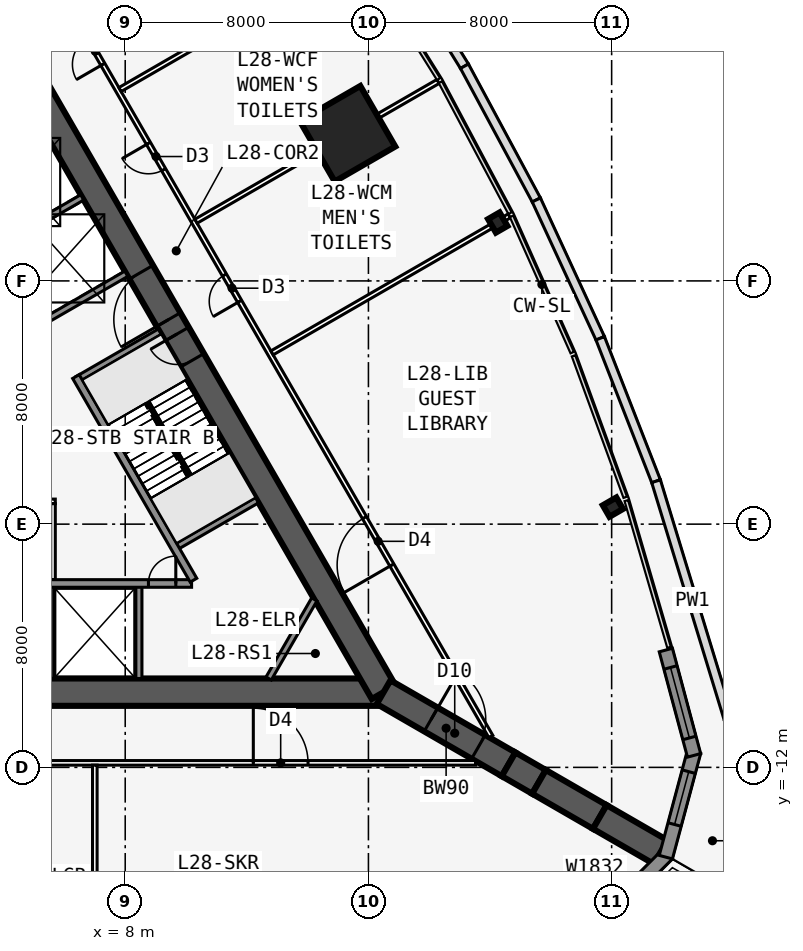
"""IFC4 building model, lengths in metres.
Left out: names, types, materials, properties, quantities, classifications, styles, units other than length and angle.
Written with IfcOpenShell. Run it as: python <this file> out.ifc"""

import sys

from ifc_helpers import new_model, si_unit, direction, frame, frame_2d, origin, origin_2d, place, context, subcontext, project, spatial, polyline, rectangle, i_section, outline, extrude, element, fill, save


model = new_model("IFC4")
c1 = context("Model", 3, precision=1e-05, world=origin(), true_north=direction((0.0, 1.0)))
c2 = subcontext(c1, "Body", "Model", "MODEL_VIEW")
j1 = project(units=[si_unit("LENGTHUNIT", "METRE"), si_unit("PLANEANGLEUNIT", "RADIAN")], contexts=[c1])
p1 = place(None, origin())
s1 = spatial("IfcSite", under=j1, at=p1, CompositionType="ELEMENT")
p2 = place(p1, origin())
s2 = spatial("IfcBuilding", under=s1, at=p2, CompositionType="ELEMENT")
p3 = place(p2, frame((0.0, 0.0, 109.7)))
s3 = spatial("IfcBuildingStorey", under=s2, at=p3, CompositionType="ELEMENT", Elevation=109.7)
p4 = place(p3, frame((-16.5, -9.526, 0.0), z_axis=(0.0, 0.0, 1.0), x_axis=(1.0, 0.0, 0.0)))
e1 = element("IfcWall", 1, at=p4, inside=s3, PredefinedType="SHEAR", context=c2, shape_type="SweptSolid", body=[
    extrude(rectangle(XDim=33.0, YDim=0.9, at=frame_2d((16.5, 0.0))), origin(), (0.0, 0.0, 1.0), 5.0),
])
p5 = place(p4, frame((14.05, 0.0, 0.0)))
e2 = element("IfcOpeningElement", 2, at=p5, cuts=e1, PredefinedType="OPENING", context=c2, shape_type="SweptSolid", body=[
    extrude(rectangle(XDim=1.8, YDim=2.13, at=frame_2d((0.9, 1.065))), frame((0.0, 0.46, 0.0), z_axis=(0.0, -1.0, 0.0), x_axis=(1.0, 0.0, 0.0)), (0.0, 0.0, 1.0), 0.92),
])
p6 = place(p3, frame((-0.55, -5.951, 0.0), z_axis=(0.0, 0.0, 1.0), x_axis=(1.0, 0.0, 0.0)))
e3 = element("IfcWall", 3, at=p6, inside=s3, PredefinedType="SOLIDWALL", context=c2, shape_type="SweptSolid", body=[
    extrude(rectangle(XDim=10.733, YDim=0.25, at=frame_2d((5.366, 0.0))), origin(), (0.0, 0.0, 1.0), 4.835),
])
p7 = place(p6, frame((9.314, 0.0, 0.0)))
e4 = element("IfcOpeningElement", 4, at=p7, cuts=e3, PredefinedType="OPENING", context=c2, shape_type="SweptSolid", body=[
    extrude(rectangle(XDim=0.9, YDim=2.13, at=frame_2d((0.45, 1.065))), frame((0.0, 0.135, 0.0), z_axis=(0.0, -1.0, 0.0), x_axis=(1.0, 0.0, 0.0)), (0.0, 0.0, 1.0), 0.27),
])
p8 = place(p6, frame((1.05, 0.0, 0.0)))
e5 = element("IfcOpeningElement", 5, at=p8, cuts=e3, PredefinedType="OPENING", context=c2, shape_type="SweptSolid", body=[
    extrude(rectangle(XDim=1.1, YDim=2.13, at=frame_2d((0.55, 1.065))), frame((0.0, 0.135, 0.0), z_axis=(0.0, -1.0, 0.0), x_axis=(1.0, 0.0, 0.0)), (0.0, 0.0, 1.0), 0.27),
])
p9 = place(p6, frame((4.05, 0.0, 0.0)))
e6 = element("IfcOpeningElement", 6, at=p9, cuts=e3, PredefinedType="OPENING", context=c2, shape_type="SweptSolid", body=[
    extrude(rectangle(XDim=1.1, YDim=2.13, at=frame_2d((0.55, 1.065))), frame((0.0, 0.135, 0.0), z_axis=(0.0, -1.0, 0.0), x_axis=(1.0, 0.0, 0.0)), (0.0, 0.0, 1.0), 0.27),
])
for number, where, z_axis, x_axis in (
    (7, (5.55, -5.951, 0.0), (0.0, 0.0, 1.0), (0.0, -1.0, 0.0)),
    (8, (8.45, -5.951, 0.0), (0.0, 0.0, 1.0), (0.0, -1.0, 0.0)),
):
    element("IfcWall", number, at=place(p3, frame(where, z_axis=z_axis, x_axis=x_axis)), inside=s3, PredefinedType="SOLIDWALL", context=c2, shape_type="SweptSolid", body=[
        extrude(rectangle(XDim=3.125, YDim=0.2, at=frame_2d((1.562, 0.0))), origin(), (0.0, 0.0, 1.0), 4.835),
    ])
p10 = place(p3, frame((16.5, -9.526, 0.0), z_axis=(0.0, 0.0, 1.0), x_axis=(-0.499999749417, 0.866025548458, 0.0)))
e9 = element("IfcWall", 9, at=p10, inside=s3, PredefinedType="SHEAR", context=c2, shape_type="SweptSolid", body=[
    extrude(rectangle(XDim=33.0, YDim=0.9, at=frame_2d((16.5, 0.0))), origin(), (0.0, 0.0, 1.0), 5.0),
])
p11 = place(p10, frame((14.15, 0.0, 0.0)))
e10 = element("IfcOpeningElement", 10, at=p11, cuts=e9, PredefinedType="OPENING", context=c2, shape_type="SweptSolid", body=[
    extrude(rectangle(XDim=1.8, YDim=2.13, at=frame_2d((0.9, 1.065))), frame((0.0, 0.46, 0.0), z_axis=(0.0, -1.0, 0.0), x_axis=(1.0, 0.0, 0.0)), (0.0, 0.0, 1.0), 0.92),
])
p12 = place(p10, frame((12.6, 0.0, 0.0)))
e11 = element("IfcOpeningElement", 11, at=p12, cuts=e9, PredefinedType="OPENING", context=c2, shape_type="SweptSolid", body=[
    extrude(rectangle(XDim=1.0, YDim=2.13, at=frame_2d((0.5, 1.065))), frame((0.0, 0.46, 0.0), z_axis=(0.0, -1.0, 0.0), x_axis=(1.0, 0.0, 0.0)), (0.0, 0.0, 1.0), 0.92),
])
p13 = place(p3, frame((10.245, -5.843, 0.0), z_axis=(0.0, 0.0, 1.0), x_axis=(-0.499993009313, 0.866029439822, 0.0)))
e12 = element("IfcWall", 12, at=p13, inside=s3, PredefinedType="SOLIDWALL", context=c2, shape_type="SweptSolid", body=[
    extrude(rectangle(XDim=7.733, YDim=0.25, at=frame_2d((3.866, 0.0))), origin(), (0.0, 0.0, 1.0), 4.835),
])
for number, where, z_axis, x_axis in (
    (13, (9.629, -4.775, 0.0), (0.0, 0.0, 1.0), (0.866, 0.5, 0.0)),
    (14, (6.429, 0.767, 0.0), (0.0, 0.0, 1.0), (0.866, 0.5, 0.0)),
    (15, (5.329, 2.673, 0.0), (0.0, 0.0, 1.0), (0.866, 0.5, 0.0)),
    (16, (3.879, 5.184, 0.0), (0.0, 0.0, 1.0), (0.866, 0.5, 0.0)),
):
    element("IfcWall", number, at=place(p3, frame(where, z_axis=z_axis, x_axis=x_axis)), inside=s3, PredefinedType="SOLIDWALL", context=c2, shape_type="SweptSolid", body=[
        extrude(rectangle(XDim=3.125, YDim=0.2, at=frame_2d((1.562, 0.0))), origin(), (0.0, 0.0, 1.0), 4.835),
    ])
p14 = place(p3, frame((16.5, -9.526, 0.0), z_axis=(0.0, 0.0, 1.0), x_axis=(0.866031398331, -0.499989616998, 0.0)))
e17 = element("IfcWall", 17, at=p14, inside=s3, PredefinedType="SHEAR", context=c2, shape_type="SweptSolid", body=[
    extrude(rectangle(XDim=4.746, YDim=0.9, at=frame_2d((2.373, 0.0))), origin(), (0.0, 0.0, 1.0), 5.0),
])
p15 = place(p14, frame((1.8, 0.0, 0.0)))
e18 = element("IfcOpeningElement", 18, at=p15, cuts=e17, PredefinedType="OPENING", context=c2, shape_type="SweptSolid", body=[
    extrude(rectangle(XDim=1.8, YDim=2.13, at=frame_2d((0.9, 1.065))), frame((0.0, 0.46, 0.0), z_axis=(0.0, -1.0, 0.0), x_axis=(1.0, 0.0, 0.0)), (0.0, 0.0, 1.0), 0.92),
])
p16 = place(p3, frame((20.61, -11.899, 0.0), z_axis=(0.0, 0.0, 1.0), x_axis=(0.866009537788, -0.500027479704, 0.0)))
e19 = element("IfcWall", 19, at=p16, inside=s3, PredefinedType="SHEAR", context=c2, shape_type="SweptSolid", body=[
    extrude(rectangle(XDim=1.155, YDim=0.9, at=frame_2d((0.577, 0.0))), origin(), (0.0, 0.0, 1.0), 5.0),
])
for number, where, z_axis, x_axis in (
    (20, (21.61, -12.477, 0.0), (0.0, 0.0, 1.0), (0.866, -0.5, 0.0)),
    (21, (23.61, -13.631, 0.0), (0.0, 0.0, 1.0), (0.866, -0.5, 0.0)),
):
    element("IfcWall", number, at=place(p3, frame(where, z_axis=z_axis, x_axis=x_axis)), inside=s3, PredefinedType="SHEAR", context=c2, shape_type="SweptSolid", body=[
        extrude(rectangle(XDim=2.309, YDim=0.9, at=frame_2d((1.155, 0.0))), origin(), (0.0, 0.0, 1.0), 5.0),
    ])
for number, where, z_axis, x_axis in (
    (22, (24.041, -3.44, 0.0), (0.0, 0.0, 1.0), (-0.5, 0.866, 0.0)),
    (23, (20.254, 5.92, 0.0), (0.0, 0.0, 1.0), (0.866, 0.5, 0.0)),
):
    element("IfcColumn", number, at=place(p3, frame(where, z_axis=z_axis, x_axis=x_axis)), inside=s3, PredefinedType="COLUMN", context=c2, shape_type="SweptSolid", body=[
        extrude(i_section(OverallWidth=0.437, OverallDepth=0.513, WebThickness=0.061, FlangeThickness=0.097, at=origin_2d()), origin(), (0.0, 0.0, 1.0), 5.0),
    ])
p17 = place(p3, frame((15.312, 8.84, 0.0), z_axis=(0.0, 0.0, 1.0), x_axis=(0.866025403784, 0.5, 0.0)))
e24 = element("IfcColumn", 24, at=p17, inside=s3, PredefinedType="COLUMN", context=c2, shape_type="SweptSolid", body=[
    extrude(rectangle(XDim=2.3, YDim=2.3, at=origin_2d()), origin(), (0.0, 0.0, 1.0), 5.0),
])
p18 = place(p3, frame((23.305, -17.388, 0.0), z_axis=(0.0, 0.0, 1.0), x_axis=(0.707106781187, 0.707106781187, 0.0)))
e25 = element("IfcWall", 25, at=p18, inside=s3, PredefinedType="SOLIDWALL", context=c2, shape_type="SweptSolid", body=[
    extrude(outline(polyline([(3.586, 0.225), (3.527, 0.225), (3.035, 0.093), (3.0, 0.225), (0.0, 0.225), (0.0, -0.225), (3.586, -0.225), (3.586, 0.225)])), origin(), (0.0, 0.0, 1.0), 4.835),
])
p19 = place(p18, frame((0.675, 0.0, 0.6)))
e26 = element("IfcOpeningElement", 26, at=p19, cuts=e25, PredefinedType="OPENING", context=c2, shape_type="SweptSolid", body=[
    extrude(rectangle(XDim=1.8, YDim=3.2, at=frame_2d((0.9, 1.6))), frame((0.0, 0.235, 0.0), z_axis=(0.0, -1.0, 0.0), x_axis=(1.0, 0.0, 0.0)), (0.0, 0.0, 1.0), 0.47),
])
p20 = place(p3, frame((25.783, -14.953, 0.0), z_axis=(0.0, 0.0, 1.0), x_axis=(0.258823421857, 0.965924653531, 0.0)))
e27 = element("IfcWall", 27, at=p20, inside=s3, PredefinedType="SOLIDWALL", context=c2, shape_type="SweptSolid", body=[
    extrude(outline(polyline([(3.586, 0.225), (0.586, 0.225), (0.551, 0.093), (0.06, 0.225), (0.0, 0.225), (0.0, -0.225), (3.586, -0.225), (3.586, 0.225)])), origin(), (0.0, 0.0, 1.0), 4.835),
])
p21 = place(p20, frame((1.111, 0.0, 0.6)))
e28 = element("IfcOpeningElement", 28, at=p21, cuts=e27, PredefinedType="OPENING", context=c2, shape_type="SweptSolid", body=[
    extrude(rectangle(XDim=1.8, YDim=3.2, at=frame_2d((0.9, 1.6))), frame((0.0, 0.235, 0.0), z_axis=(0.0, -1.0, 0.0), x_axis=(1.0, 0.0, 0.0)), (0.0, 0.0, 1.0), 0.47),
])
p22 = place(p3, frame((26.711, -11.605, 0.0), z_axis=(0.0, 0.0, 1.0), x_axis=(-0.258823421857, 0.965924653531, 0.0)))
e29 = element("IfcWall", 29, at=p22, inside=s3, PredefinedType="SOLIDWALL", context=c2, shape_type="SweptSolid", body=[
    extrude(rectangle(XDim=3.586, YDim=0.45, at=frame_2d((1.793, 0.0))), origin(), (0.0, 0.0, 1.0), 4.835),
])
p23 = place(p22, frame((0.593, 0.0, 0.6)))
e30 = element("IfcOpeningElement", 30, at=p23, cuts=e29, PredefinedType="OPENING", context=c2, shape_type="SweptSolid", body=[
    extrude(rectangle(XDim=2.4, YDim=3.2, at=frame_2d((1.2, 1.6))), frame((0.0, 0.235, 0.0), z_axis=(0.0, -1.0, 0.0), x_axis=(1.0, 0.0, 0.0)), (0.0, 0.0, 1.0), 0.47),
])
p24 = place(p3, frame((16.531, 15.308, 0.0), z_axis=(0.0, 0.0, 1.0), x_axis=(0.526139147264, -0.850398493482, 0.0)))
e31 = element("IfcWall", 31, at=p24, inside=s3, PredefinedType="PARAPET", context=c2, shape_type="SweptSolid", body=[
    extrude(rectangle(XDim=4.993, YDim=0.3, at=frame_2d((2.497, 0.0))), origin(), (0.0, 0.0, 1.0), 1.1),
])
p25 = place(p3, frame((19.159, 11.061, 0.0), z_axis=(0.0, 0.0, 1.0), x_axis=(0.473402806561, -0.880846060751, 0.0)))
e32 = element("IfcWall", 32, at=p25, inside=s3, PredefinedType="PARAPET", context=c2, shape_type="SweptSolid", body=[
    extrude(rectangle(XDim=4.993, YDim=0.3, at=frame_2d((2.497, 0.0))), origin(), (0.0, 0.0, 1.0), 1.1),
])
p26 = place(p3, frame((21.522, 6.663, 0.0), z_axis=(0.0, 0.0, 1.0), x_axis=(0.419172470684, -0.907906625056, 0.0)))
e33 = element("IfcWall", 33, at=p26, inside=s3, PredefinedType="PARAPET", context=c2, shape_type="SweptSolid", body=[
    extrude(rectangle(XDim=5.012, YDim=0.3, at=frame_2d((2.506, 0.0))), origin(), (0.0, 0.0, 1.0), 1.1),
])
p27 = place(p3, frame((23.623, 2.113, 0.0), z_axis=(0.0, 0.0, 1.0), x_axis=(0.364040028131, -0.931383303436, 0.0)))
e34 = element("IfcWall", 34, at=p27, inside=s3, PredefinedType="PARAPET", context=c2, shape_type="SweptSolid", body=[
    extrude(rectangle(XDim=5.047, YDim=0.3, at=frame_2d((2.524, 0.0))), origin(), (0.0, 0.0, 1.0), 1.1),
])
p28 = place(p3, frame((25.461, -2.588, 0.0), z_axis=(0.0, 0.0, 1.0), x_axis=(0.291972778305, -0.956426629036, 0.0)))
e35 = element("IfcWall", 35, at=p28, inside=s3, PredefinedType="PARAPET", context=c2, shape_type="SweptSolid", body=[
    extrude(rectangle(XDim=8.203, YDim=0.3, at=frame_2d((4.102, 0.0))), origin(), (0.0, 0.0, 1.0), 1.1),
])
p29 = place(p3, frame((-19.527, -11.851, 0.0), z_axis=(0.0, 0.0, 1.0), x_axis=(1.0, 0.0, 0.0)))
e36 = element("IfcWall", 36, at=p29, inside=s3, PredefinedType="PARTITIONING", context=c2, shape_type="SweptSolid", body=[
    extrude(rectangle(XDim=39.054, YDim=0.15, at=frame_2d((19.527, 0.0))), origin(), (0.0, 0.0, 1.0), 4.835),
])
p30 = place(p29, frame((10.513, 0.0, 0.0)))
e37 = element("IfcOpeningElement", 37, at=p30, cuts=e36, PredefinedType="OPENING", context=c2, shape_type="SweptSolid", body=[
    extrude(rectangle(XDim=1.8, YDim=2.13, at=frame_2d((0.9, 1.065))), frame((0.0, 0.085, 0.0), z_axis=(0.0, -1.0, 0.0), x_axis=(1.0, 0.0, 0.0)), (0.0, 0.0, 1.0), 0.17),
])
p31 = place(p29, frame((24.027, 0.0, 0.0)))
e38 = element("IfcOpeningElement", 38, at=p31, cuts=e36, PredefinedType="OPENING", context=c2, shape_type="SweptSolid", body=[
    extrude(rectangle(XDim=1.0, YDim=2.13, at=frame_2d((0.5, 1.065))), frame((0.0, 0.085, 0.0), z_axis=(0.0, -1.0, 0.0), x_axis=(1.0, 0.0, 0.0)), (0.0, 0.0, 1.0), 0.17),
])
p32 = place(p29, frame((31.74, 0.0, 0.0)))
e39 = element("IfcOpeningElement", 39, at=p32, cuts=e36, PredefinedType="OPENING", context=c2, shape_type="SweptSolid", body=[
    extrude(rectangle(XDim=1.8, YDim=2.13, at=frame_2d((0.9, 1.065))), frame((0.0, 0.085, 0.0), z_axis=(0.0, -1.0, 0.0), x_axis=(1.0, 0.0, 0.0)), (0.0, 0.0, 1.0), 0.17),
])
p33 = place(p3, frame((7.0, -11.926, 0.0), z_axis=(0.0, 0.0, 1.0), x_axis=(0.0, -1.0, 0.0)))
e40 = element("IfcWall", 40, at=p33, inside=s3, PredefinedType="PARTITIONING", context=c2, shape_type="SweptSolid", body=[
    extrude(rectangle(XDim=8.76, YDim=0.15, at=frame_2d((4.38, 0.0))), origin(), (0.0, 0.0, 1.0), 4.835),
])
p34 = place(p3, frame((20.027, -10.985, 0.0), z_axis=(0.0, 0.0, 1.0), x_axis=(-0.500001677587, 0.866024435227, 0.0)))
e41 = element("IfcWall", 41, at=p34, inside=s3, PredefinedType="PARTITIONING", context=c2, shape_type="SweptSolid", body=[
    extrude(rectangle(XDim=39.054, YDim=0.15, at=frame_2d((19.527, 0.0))), origin(), (0.0, 0.0, 1.0), 4.835),
])
p35 = place(p34, frame((6.513, 0.0, 0.0)))
e42 = element("IfcOpeningElement", 42, at=p35, cuts=e41, PredefinedType="OPENING", context=c2, shape_type="SweptSolid", body=[
    extrude(rectangle(XDim=1.8, YDim=2.13, at=frame_2d((0.9, 1.065))), frame((0.0, 0.085, 0.0), z_axis=(0.0, -1.0, 0.0), x_axis=(1.0, 0.0, 0.0)), (0.0, 0.0, 1.0), 0.17),
])
p36 = place(p34, frame((16.527, 0.0, 0.0)))
e43 = element("IfcOpeningElement", 43, at=p36, cuts=e41, PredefinedType="OPENING", context=c2, shape_type="SweptSolid", body=[
    extrude(rectangle(XDim=1.0, YDim=2.13, at=frame_2d((0.5, 1.065))), frame((0.0, 0.085, 0.0), z_axis=(0.0, -1.0, 0.0), x_axis=(1.0, 0.0, 0.0)), (0.0, 0.0, 1.0), 0.17),
])
p37 = place(p34, frame((21.527, 0.0, 0.0)))
e44 = element("IfcOpeningElement", 44, at=p37, cuts=e41, PredefinedType="OPENING", context=c2, shape_type="SweptSolid", body=[
    extrude(rectangle(XDim=1.0, YDim=2.13, at=frame_2d((0.5, 1.065))), frame((0.0, 0.085, 0.0), z_axis=(0.0, -1.0, 0.0), x_axis=(1.0, 0.0, 0.0)), (0.0, 0.0, 1.0), 0.17),
])
p38 = place(p34, frame((25.527, 0.0, 0.0)))
e45 = element("IfcOpeningElement", 45, at=p38, cuts=e41, PredefinedType="OPENING", context=c2, shape_type="SweptSolid", body=[
    extrude(rectangle(XDim=1.0, YDim=2.13, at=frame_2d((0.5, 1.065))), frame((0.0, 0.085, 0.0), z_axis=(0.0, -1.0, 0.0), x_axis=(1.0, 0.0, 0.0)), (0.0, 0.0, 1.0), 0.17),
])
p39 = place(p34, frame((32.24, 0.0, 0.0)))
e46 = element("IfcOpeningElement", 46, at=p39, cuts=e41, PredefinedType="OPENING", context=c2, shape_type="SweptSolid", body=[
    extrude(rectangle(XDim=1.8, YDim=2.13, at=frame_2d((0.9, 1.065))), frame((0.0, 0.085, 0.0), z_axis=(0.0, -1.0, 0.0), x_axis=(1.0, 0.0, 0.0)), (0.0, 0.0, 1.0), 0.17),
])
p40 = place(p3, frame((12.829, 1.633, 0.0), z_axis=(0.0, 0.0, 1.0), x_axis=(0.866028563435, 0.499994527285, 0.0)))
e47 = element("IfcWall", 47, at=p40, inside=s3, PredefinedType="PARTITIONING", context=c2, shape_type="SweptSolid", body=[
    extrude(rectangle(XDim=9.01, YDim=0.15, at=frame_2d((4.505, 0.0))), origin(), (0.0, 0.0, 1.0), 3.989),
])
p41 = place(p3, frame((10.329, 5.963, 0.0), z_axis=(0.0, 0.0, 1.0), x_axis=(0.866017936952, 0.500012932711, 0.0)))
e48 = element("IfcWall", 48, at=p41, inside=s3, PredefinedType="PARTITIONING", context=c2, shape_type="SweptSolid", body=[
    extrude(rectangle(XDim=9.191, YDim=0.15, at=frame_2d((4.596, 0.0))), origin(), (0.0, 0.0, 1.0), 3.989),
])
p42 = place(p3, frame((7.829, 10.293, 0.0), z_axis=(0.0, 0.0, 1.0), x_axis=(0.866010056275, 0.500026581724, 0.0)))
e49 = element("IfcWall", 49, at=p42, inside=s3, PredefinedType="PARTITIONING", context=c2, shape_type="SweptSolid", body=[
    extrude(rectangle(XDim=9.01, YDim=0.15, at=frame_2d((4.505, 0.0))), origin(), (0.0, 0.0, 1.0), 3.989),
])
p43 = place(p3, frame((-2.65, -3.251, 0.0), z_axis=(0.0, 0.0, 1.0), x_axis=(1.0, 0.0, 0.0)))
e50 = element("IfcWall", 50, at=p43, inside=s3, PredefinedType="PARTITIONING", context=c2, shape_type="SweptSolid", body=[
    extrude(rectangle(XDim=8.35, YDim=0.15, at=frame_2d((4.175, 0.0))), origin(), (0.0, 0.0, 1.0), 4.835),
])
p44 = place(p3, frame((5.625, -5.826, 0.0), z_axis=(0.0, 0.0, 1.0), x_axis=(0.0, 1.0, 0.0)))
e51 = element("IfcWall", 51, at=p44, inside=s3, PredefinedType="PARTITIONING", context=c2, shape_type="SweptSolid", body=[
    extrude(rectangle(XDim=2.5, YDim=0.15, at=frame_2d((1.25, 0.0))), origin(), (0.0, 0.0, 1.0), 4.835),
])
p45 = place(p3, frame((14.219, -6.476, 0.0), z_axis=(0.0, 0.0, 1.0), x_axis=(-0.499952404951, -0.866052881055, 0.0)))
e52 = element("IfcWall", 52, at=p45, inside=s3, PredefinedType="SOLIDWALL", context=c2, shape_type="SweptSolid", body=[
    extrude(rectangle(XDim=3.002, YDim=0.2, at=frame_2d((1.501, 0.0))), origin(), (0.0, 0.0, 1.0), 4.835),
])
p46 = place(p3, frame((10.135, -2.401, 0.0), z_axis=(0.0, 0.0, 1.0), x_axis=(-0.499992232847, 0.866029888106, 0.0)))
e53 = element("IfcWall", 53, at=p46, inside=s3, PredefinedType="SOLIDWALL", context=c2, shape_type="SweptSolid", body=[
    extrude(rectangle(XDim=2.794, YDim=0.1, at=frame_2d((1.397, 0.0))), origin(), (0.0, 0.0, 1.0), 5.0),
])
p47 = place(p21, origin())
e54 = element("IfcWindow", 54, at=p47, inside=s3, PartitioningType="SINGLE_PANEL", PredefinedType="WINDOW", context=c2, shape_type="SweptSolid", body=[
    extrude(rectangle(XDim=1.8, YDim=3.2, at=frame_2d((0.9, 1.6))), frame((0.0, 0.03, 0.0), z_axis=(0.0, -1.0, 0.0), x_axis=(1.0, 0.0, 0.0)), (0.0, 0.0, 1.0), 0.06),
])
fill(e28, e54)
p48 = place(p23, origin())
e55 = element("IfcWindow", 55, at=p48, inside=s3, PartitioningType="SINGLE_PANEL", PredefinedType="WINDOW", context=c2, shape_type="SweptSolid", body=[
    extrude(rectangle(XDim=2.4, YDim=3.2, at=frame_2d((1.2, 1.6))), frame((0.0, 0.03, 0.0), z_axis=(0.0, -1.0, 0.0), x_axis=(1.0, 0.0, 0.0)), (0.0, 0.0, 1.0), 0.06),
])
fill(e30, e55)
p49 = place(p32, origin())
e56 = element("IfcDoor", 56, at=p49, inside=s3, OperationType="DOUBLE_DOOR_SINGLE_SWING", PredefinedType="DOOR", context=c2, shape_type="SweptSolid", body=[
    extrude(rectangle(XDim=1.8, YDim=2.13, at=frame_2d((0.9, 1.065))), frame((0.0, 0.025, 0.0), z_axis=(0.0, -1.0, 0.0), x_axis=(1.0, 0.0, 0.0)), (0.0, 0.0, 1.0), 0.05),
])
fill(e39, e56)
p50 = place(p35, origin())
e57 = element("IfcDoor", 57, at=p50, inside=s3, OperationType="DOUBLE_DOOR_SINGLE_SWING", PredefinedType="DOOR", context=c2, shape_type="SweptSolid", body=[
    extrude(rectangle(XDim=1.8, YDim=2.13, at=frame_2d((0.9, 1.065))), frame((0.0, 0.025, 0.0), z_axis=(0.0, -1.0, 0.0), x_axis=(1.0, 0.0, 0.0)), (0.0, 0.0, 1.0), 0.05),
])
fill(e42, e57)
p51 = place(p36, origin())
e58 = element("IfcDoor", 58, at=p51, inside=s3, OperationType="SINGLE_SWING_LEFT", PredefinedType="DOOR", context=c2, shape_type="SweptSolid", body=[
    extrude(rectangle(XDim=1.0, YDim=2.13, at=frame_2d((0.5, 1.065))), frame((0.0, 0.025, 0.0), z_axis=(0.0, -1.0, 0.0), x_axis=(1.0, 0.0, 0.0)), (0.0, 0.0, 1.0), 0.05),
])
fill(e43, e58)
p52 = place(p37, origin())
e59 = element("IfcDoor", 59, at=p52, inside=s3, OperationType="SINGLE_SWING_RIGHT", PredefinedType="DOOR", context=c2, shape_type="SweptSolid", body=[
    extrude(rectangle(XDim=1.0, YDim=2.13, at=frame_2d((0.5, 1.065))), frame((0.0, 0.025, 0.0), z_axis=(0.0, -1.0, 0.0), x_axis=(1.0, 0.0, 0.0)), (0.0, 0.0, 1.0), 0.05),
])
fill(e44, e59)
p53 = place(p38, origin())
e60 = element("IfcDoor", 60, at=p53, inside=s3, OperationType="SINGLE_SWING_LEFT", PredefinedType="DOOR", context=c2, shape_type="SweptSolid", body=[
    extrude(rectangle(XDim=1.0, YDim=2.13, at=frame_2d((0.5, 1.065))), frame((0.0, 0.025, 0.0), z_axis=(0.0, -1.0, 0.0), x_axis=(1.0, 0.0, 0.0)), (0.0, 0.0, 1.0), 0.05),
])
fill(e45, e60)
p54 = place(p11, origin())
e61 = element("IfcDoor", 61, at=p54, inside=s3, OperationType="DOUBLE_DOOR_SINGLE_SWING", PredefinedType="DOOR", context=c2, shape_type="SweptSolid", body=[
    extrude(rectangle(XDim=1.8, YDim=2.13, at=frame_2d((0.9, 1.065))), frame((0.0, 0.025, 0.0), z_axis=(0.0, -1.0, 0.0), x_axis=(1.0, 0.0, 0.0)), (0.0, 0.0, 1.0), 0.05),
])
fill(e10, e61)
p55 = place(p12, origin())
e62 = element("IfcDoor", 62, at=p55, inside=s3, OperationType="SINGLE_SWING_RIGHT", PredefinedType="DOOR", context=c2, shape_type="SweptSolid", body=[
    extrude(rectangle(XDim=1.0, YDim=2.13, at=frame_2d((0.5, 1.065))), frame((0.0, 0.025, 0.0), z_axis=(0.0, -1.0, 0.0), x_axis=(1.0, 0.0, 0.0)), (0.0, 0.0, 1.0), 0.05),
])
fill(e11, e62)
p56 = place(p15, origin())
e63 = element("IfcDoor", 63, at=p56, inside=s3, OperationType="DOUBLE_DOOR_DOUBLE_SWING", PredefinedType="DOOR", context=c2, shape_type="SweptSolid", body=[
    extrude(rectangle(XDim=1.8, YDim=2.13, at=frame_2d((0.9, 1.065))), frame((0.0, 0.025, 0.0), z_axis=(0.0, -1.0, 0.0), x_axis=(1.0, 0.0, 0.0)), (0.0, 0.0, 1.0), 0.05),
])
fill(e18, e63)
p57 = place(p7, origin())
e64 = element("IfcDoor", 64, at=p57, inside=s3, OperationType="SINGLE_SWING_RIGHT", PredefinedType="DOOR", context=c2, shape_type="SweptSolid", body=[
    extrude(rectangle(XDim=0.9, YDim=2.13, at=frame_2d((0.45, 1.065))), frame((0.0, 0.025, 0.0), z_axis=(0.0, -1.0, 0.0), x_axis=(1.0, 0.0, 0.0)), (0.0, 0.0, 1.0), 0.05),
])
fill(e4, e64)
save(model, sys.argv[1])
